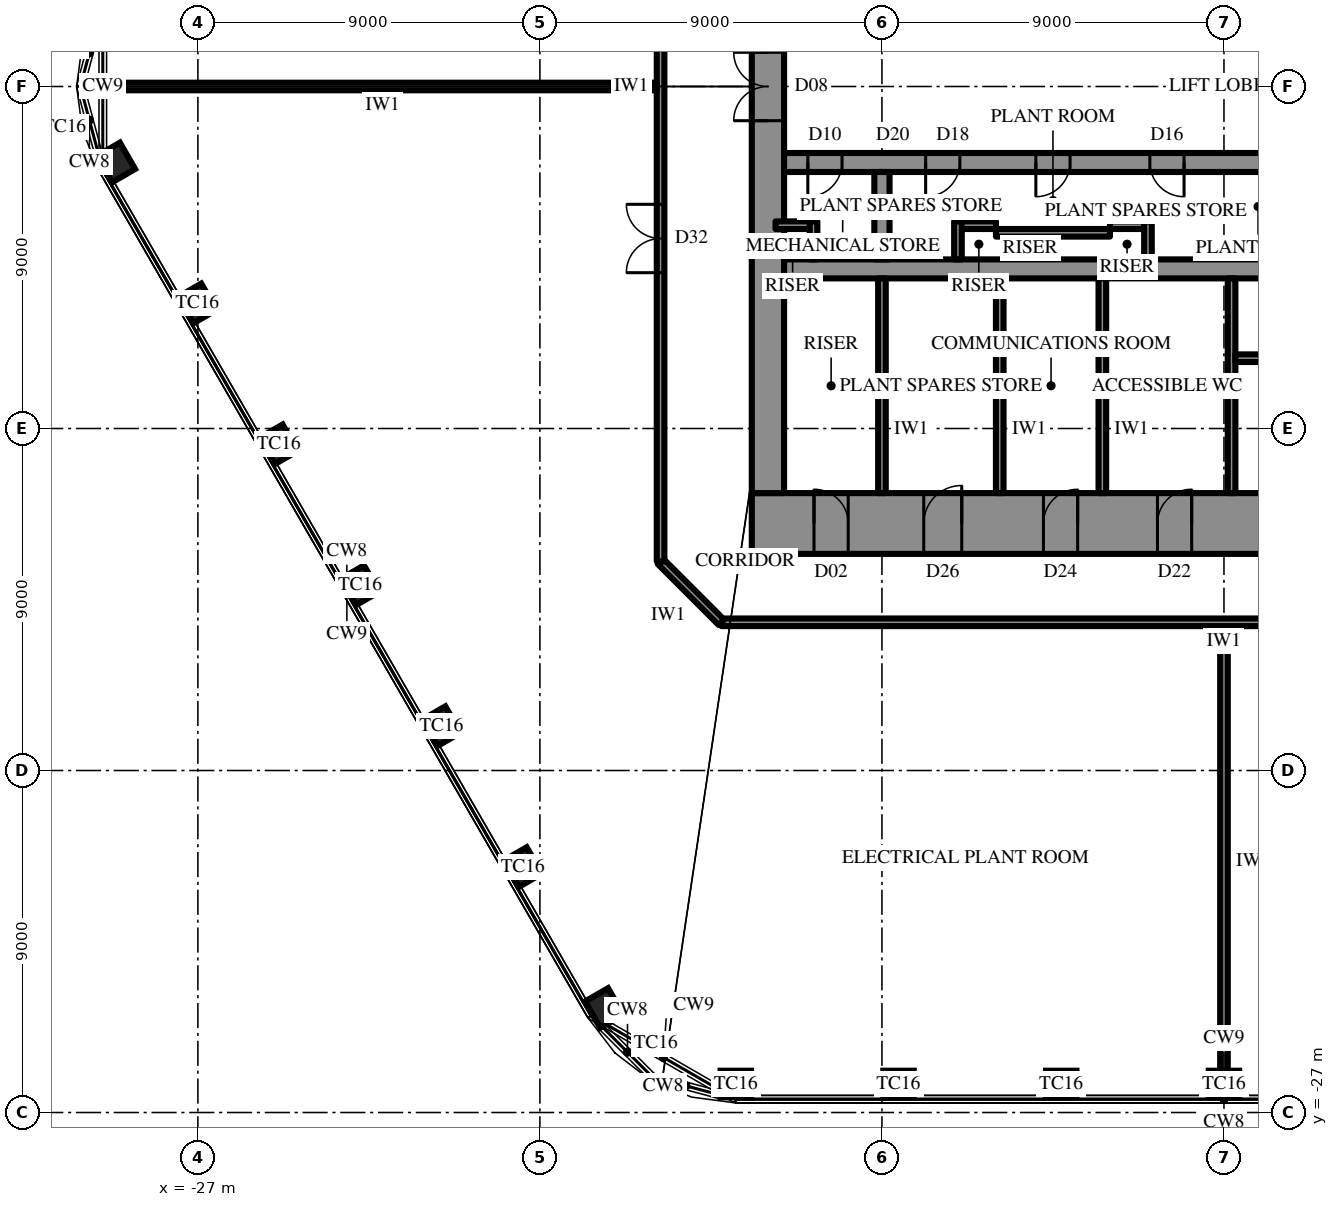
"""IFC4 building model, lengths in metres.
Left out: names, types, materials, properties, quantities, classifications, styles, units other than length and angle.
Written with IfcOpenShell. Run it as: python <this file> out.ifc"""

import sys

from ifc_helpers import new_model, si_unit, direction, frame, frame_2d, origin, origin_2d, place, context, subcontext, project, spatial, rectangle, extrude, element, fill, save


model = new_model("IFC4")
c1 = context("Model", 3, precision=1e-05, world=origin(), true_north=direction((0.0, 1.0)))
c2 = subcontext(c1, "Body", "Model", "MODEL_VIEW")
j1 = project(units=[si_unit("LENGTHUNIT", "METRE"), si_unit("PLANEANGLEUNIT", "RADIAN")], contexts=[c1])
p1 = place(None, origin())
s1 = spatial("IfcSite", under=j1, at=p1, CompositionType="ELEMENT")
p2 = place(p1, origin())
s2 = spatial("IfcBuilding", under=s1, at=p2, CompositionType="ELEMENT")
p3 = place(p2, frame((0.0, 0.0, 402.3)))
s3 = spatial("IfcBuildingStorey", under=s2, at=p3, CompositionType="ELEMENT", Elevation=402.3)
for number, where, z_axis, x_axis in (
    (1, (-29.156, -2.0, 0.0), (0.0, 0.0, 1.0), (0.5, -0.866, 0.0)),
    (2, (-27.015, -5.708, 0.0), (0.0, 0.0, 1.0), (0.5, -0.866, 0.0)),
    (3, (-24.874, -9.417, 0.0), (0.0, 0.0, 1.0), (0.5, -0.866, 0.0)),
    (4, (-22.733, -13.125, 0.0), (0.0, 0.0, 1.0), (0.5, -0.866, 0.0)),
    (5, (-20.592, -16.833, 0.0), (0.0, 0.0, 1.0), (0.5, -0.866, 0.0)),
    (6, (-18.451, -20.542, 0.0), (0.0, 0.0, 1.0), (0.5, -0.866, 0.0)),
    (7, (-16.31, -24.25, 0.0), (0.0, 0.0, 1.0), (0.5, -0.866, 0.0)),
    (8, (-12.846, -26.25, 0.0), (0.0, 0.0, 1.0), (1.0, 0.0, 0.0)),
    (9, (-8.564, -26.25, 0.0), (0.0, 0.0, 1.0), (1.0, 0.0, 0.0)),
    (10, (-4.282, -26.25, 0.0), (0.0, 0.0, 1.0), (1.0, 0.0, 0.0)),
    (11, (0.0, -26.25, 0.0), (0.0, 0.0, 1.0), (1.0, 0.0, 0.0)),
):
    element("IfcColumn", number, at=place(p3, frame(where, z_axis=z_axis, x_axis=x_axis)), inside=s3, PredefinedType="COLUMN", context=c2, shape_type="SweptSolid", body=[
        extrude(rectangle(XDim=0.8, YDim=0.7, at=origin_2d()), origin(), (0.0, 0.0, 1.0), 6.0),
    ])
p4 = place(p3, frame((12.425, -11.5, 0.0), z_axis=(0.0, 0.0, 1.0), x_axis=(-1.0, 0.0, 0.0)))
e12 = element("IfcWall", 12, at=p4, inside=s3, PredefinedType="SHEAR", context=c2, shape_type="SweptSolid", body=[
    extrude(rectangle(XDim=24.85, YDim=1.6, at=frame_2d((12.425, 0.0))), origin(), (0.0, 0.0, 1.0), 6.0),
])
p5 = place(p4, frame((13.275, 0.0, 0.0)))
e13 = element("IfcOpeningElement", 13, at=p5, cuts=e12, PredefinedType="OPENING", context=c2, shape_type="SweptSolid", body=[
    extrude(rectangle(XDim=0.9, YDim=2.2, at=frame_2d((0.45, 1.1))), frame((0.0, 0.81, 0.0), z_axis=(0.0, -1.0, 0.0), x_axis=(1.0, 0.0, 0.0)), (0.0, 0.0, 1.0), 1.62),
])
p6 = place(p4, frame((16.275, 0.0, 0.0)))
e14 = element("IfcOpeningElement", 14, at=p6, cuts=e12, PredefinedType="OPENING", context=c2, shape_type="SweptSolid", body=[
    extrude(rectangle(XDim=0.9, YDim=2.2, at=frame_2d((0.45, 1.1))), frame((0.0, 0.81, 0.0), z_axis=(0.0, -1.0, 0.0), x_axis=(1.0, 0.0, 0.0)), (0.0, 0.0, 1.0), 1.62),
])
p7 = place(p4, frame((19.325, 0.0, 0.0)))
e15 = element("IfcOpeningElement", 15, at=p7, cuts=e12, PredefinedType="OPENING", context=c2, shape_type="SweptSolid", body=[
    extrude(rectangle(XDim=1.0, YDim=2.2, at=frame_2d((0.5, 1.1))), frame((0.0, 0.81, 0.0), z_axis=(0.0, -1.0, 0.0), x_axis=(1.0, 0.0, 0.0)), (0.0, 0.0, 1.0), 1.62),
])
p8 = place(p4, frame((1.637, 0.0, 0.0)))
e16 = element("IfcOpeningElement", 16, at=p8, cuts=e12, PredefinedType="OPENING", context=c2, shape_type="SweptSolid", body=[
    extrude(rectangle(XDim=0.9, YDim=2.2, at=frame_2d((0.45, 1.1))), frame((0.0, 0.81, 0.0), z_axis=(0.0, -1.0, 0.0), x_axis=(1.0, 0.0, 0.0)), (0.0, 0.0, 1.0), 1.62),
])
p9 = place(p4, frame((22.312, 0.0, 0.0)))
e17 = element("IfcOpeningElement", 17, at=p9, cuts=e12, PredefinedType="OPENING", context=c2, shape_type="SweptSolid", body=[
    extrude(rectangle(XDim=0.9, YDim=2.2, at=frame_2d((0.45, 1.1))), frame((0.0, 0.81, 0.0), z_axis=(0.0, -1.0, 0.0), x_axis=(1.0, 0.0, 0.0)), (0.0, 0.0, 1.0), 1.62),
])
p10 = place(p3, frame((-12.0, 10.7, 0.0), z_axis=(0.0, 0.0, 1.0), x_axis=(0.0, -1.0, 0.0)))
e18 = element("IfcWall", 18, at=p10, inside=s3, PredefinedType="SHEAR", context=c2, shape_type="SweptSolid", body=[
    extrude(rectangle(XDim=21.4, YDim=0.85, at=frame_2d((10.7, 0.0))), origin(), (0.0, 0.0, 1.0), 6.0),
])
p11 = place(p10, frame((9.8, 0.0, 0.0)))
e19 = element("IfcOpeningElement", 19, at=p11, cuts=e18, PredefinedType="OPENING", context=c2, shape_type="SweptSolid", body=[
    extrude(rectangle(XDim=1.8, YDim=2.4, at=frame_2d((0.9, 1.2))), frame((0.0, 0.435, 0.0), z_axis=(0.0, -1.0, 0.0), x_axis=(1.0, 0.0, 0.0)), (0.0, 0.0, 1.0), 0.87),
])
p12 = place(p3, frame((3.2, -2.0, 0.0), z_axis=(0.0, 0.0, 1.0), x_axis=(-1.0, 0.0, 0.0)))
e20 = element("IfcWall", 20, at=p12, inside=s3, PredefinedType="SHEAR", context=c2, shape_type="SweptSolid", body=[
    extrude(rectangle(XDim=14.775, YDim=0.5, at=frame_2d((7.387, 0.0))), origin(), (0.0, 0.0, 1.0), 6.0),
])
p13 = place(p12, frame((1.35, 0.0, 0.0)))
e21 = element("IfcOpeningElement", 21, at=p13, cuts=e20, PredefinedType="OPENING", context=c2, shape_type="SweptSolid", body=[
    extrude(rectangle(XDim=0.9, YDim=2.2, at=frame_2d((0.45, 1.1))), frame((0.0, 0.26, 0.0), z_axis=(0.0, -1.0, 0.0), x_axis=(1.0, 0.0, 0.0)), (0.0, 0.0, 1.0), 0.52),
])
p14 = place(p12, frame((4.25, 0.0, 0.0)))
e22 = element("IfcOpeningElement", 22, at=p14, cuts=e20, PredefinedType="OPENING", context=c2, shape_type="SweptSolid", body=[
    extrude(rectangle(XDim=0.9, YDim=2.2, at=frame_2d((0.45, 1.1))), frame((0.0, 0.26, 0.0), z_axis=(0.0, -1.0, 0.0), x_axis=(1.0, 0.0, 0.0)), (0.0, 0.0, 1.0), 0.52),
])
p15 = place(p12, frame((7.25, 0.0, 0.0)))
e23 = element("IfcOpeningElement", 23, at=p15, cuts=e20, PredefinedType="OPENING", context=c2, shape_type="SweptSolid", body=[
    extrude(rectangle(XDim=0.9, YDim=2.2, at=frame_2d((0.45, 1.1))), frame((0.0, 0.26, 0.0), z_axis=(0.0, -1.0, 0.0), x_axis=(1.0, 0.0, 0.0)), (0.0, 0.0, 1.0), 0.52),
])
p16 = place(p12, frame((10.15, 0.0, 0.0)))
e24 = element("IfcOpeningElement", 24, at=p16, cuts=e20, PredefinedType="OPENING", context=c2, shape_type="SweptSolid", body=[
    extrude(rectangle(XDim=0.9, YDim=2.2, at=frame_2d((0.45, 1.1))), frame((0.0, 0.26, 0.0), z_axis=(0.0, -1.0, 0.0), x_axis=(1.0, 0.0, 0.0)), (0.0, 0.0, 1.0), 0.52),
])
p17 = place(p12, frame((13.25, 0.0, 0.0)))
e25 = element("IfcOpeningElement", 25, at=p17, cuts=e20, PredefinedType="OPENING", context=c2, shape_type="SweptSolid", body=[
    extrude(rectangle(XDim=0.9, YDim=2.2, at=frame_2d((0.45, 1.1))), frame((0.0, 0.26, 0.0), z_axis=(0.0, -1.0, 0.0), x_axis=(1.0, 0.0, 0.0)), (0.0, 0.0, 1.0), 0.52),
])
p18 = place(p3, frame((11.575, -4.8, 0.0), z_axis=(0.0, 0.0, 1.0), x_axis=(-1.0, 0.0, 0.0)))
e26 = element("IfcWall", 26, at=p18, inside=s3, PredefinedType="SHEAR", context=c2, shape_type="SweptSolid", body=[
    extrude(rectangle(XDim=23.15, YDim=0.5, at=frame_2d((11.575, 0.0))), origin(), (0.0, 0.0, 1.0), 6.0),
])
p19 = place(p18, frame((6.475, 0.0, 0.0)))
e27 = element("IfcOpeningElement", 27, at=p19, cuts=e26, PredefinedType="OPENING", context=c2, shape_type="SweptSolid", body=[
    extrude(rectangle(XDim=1.2, YDim=2.2, at=frame_2d((0.6, 1.1))), frame((0.0, 0.26, 0.0), z_axis=(0.0, -1.0, 0.0), x_axis=(1.0, 0.0, 0.0)), (0.0, 0.0, 1.0), 0.52),
])
p20 = place(p18, frame((3.475, 0.0, 0.0)))
e28 = element("IfcOpeningElement", 28, at=p20, cuts=e26, PredefinedType="OPENING", context=c2, shape_type="SweptSolid", body=[
    extrude(rectangle(XDim=1.2, YDim=2.2, at=frame_2d((0.6, 1.1))), frame((0.0, 0.26, 0.0), z_axis=(0.0, -1.0, 0.0), x_axis=(1.0, 0.0, 0.0)), (0.0, 0.0, 1.0), 0.52),
])
p21 = place(p3, frame((-9.0, -2.25, 0.0), z_axis=(0.0, 0.0, 1.0), x_axis=(0.0, -1.0, 0.0)))
e29 = element("IfcWall", 29, at=p21, inside=s3, PredefinedType="SHEAR", context=c2, shape_type="SweptSolid", body=[
    extrude(rectangle(XDim=2.3, YDim=0.4, at=frame_2d((1.15, 0.0))), origin(), (0.0, 0.0, 1.0), 6.0),
])
p22 = place(p3, frame((0.2, -5.05, 0.0), z_axis=(0.0, 0.0, 1.0), x_axis=(0.0, -1.0, 0.0)))
e30 = element("IfcWall", 30, at=p22, inside=s3, PredefinedType="SHEAR", context=c2, shape_type="SweptSolid", body=[
    extrude(rectangle(XDim=5.65, YDim=0.2, at=frame_2d((2.825, 0.0))), origin(), (0.0, 0.0, 1.0), 6.0),
])
p23 = place(p3, frame((8.9, -7.15, 0.0), z_axis=(0.0, 0.0, 1.0), x_axis=(-1.0, 0.0, 0.0)))
e31 = element("IfcWall", 31, at=p23, inside=s3, PredefinedType="SHEAR", context=c2, shape_type="SweptSolid", body=[
    extrude(rectangle(XDim=8.6, YDim=0.2, at=frame_2d((4.3, 0.0))), origin(), (0.0, 0.0, 1.0), 6.0),
])
p24 = place(p23, frame((0.3, 0.0, 0.0)))
e32 = element("IfcOpeningElement", 32, at=p24, cuts=e31, PredefinedType="OPENING", context=c2, shape_type="SweptSolid", body=[
    extrude(rectangle(XDim=1.0, YDim=2.2, at=frame_2d((0.5, 1.1))), frame((0.0, 0.11, 0.0), z_axis=(0.0, -1.0, 0.0), x_axis=(1.0, 0.0, 0.0)), (0.0, 0.0, 1.0), 0.22),
])
for number, where, z_axis, x_axis in (
    (33, (-9.0, -5.05, 0.0), (0.0, 0.0, 1.0), (0.0, -1.0, 0.0)),
    (34, (-3.2, -5.05, 0.0), (0.0, 0.0, 1.0), (0.0, -1.0, 0.0)),
    (35, (-5.9, -5.05, 0.0), (0.0, 0.0, 1.0), (0.0, -1.0, 0.0)),
):
    element("IfcWall", number, at=place(p3, frame(where, z_axis=z_axis, x_axis=x_axis)), inside=s3, PredefinedType="PARTITIONING", context=c2, shape_type="SweptSolid", body=[
        extrude(rectangle(XDim=5.65, YDim=0.2, at=frame_2d((2.825, 0.0))), origin(), (0.0, 0.0, 1.0), 5.7),
    ])
for number, where, z_axis, x_axis in (
    (36, (-2.0, -3.65, 0.0), (0.0, 0.0, 1.0), (-1.0, 0.0, 0.0)),
    (37, (-2.0, -3.55, 0.0), (0.0, 0.0, 1.0), (0.0, -1.0, 0.0)),
):
    element("IfcWall", number, at=place(p3, frame(where, z_axis=z_axis, x_axis=x_axis)), inside=s3, PredefinedType="PARTITIONING", context=c2, shape_type="SweptSolid", body=[
        extrude(rectangle(XDim=1.0, YDim=0.2, at=frame_2d((0.5, 0.0))), origin(), (0.0, 0.0, 1.0), 5.7),
    ])
p25 = place(p3, frame((-3.0, -3.85, 0.0), z_axis=(0.0, 0.0, 1.0), x_axis=(-1.0, 0.0, 0.0)))
e38 = element("IfcWall", 38, at=p25, inside=s3, PredefinedType="PARTITIONING", context=c2, shape_type="SweptSolid", body=[
    extrude(rectangle(XDim=3.0, YDim=0.2, at=frame_2d((1.5, 0.0))), origin(), (0.0, 0.0, 1.0), 5.7),
])
for number, where, z_axis, x_axis in (
    (39, (-6.0, -3.65, 0.0), (0.0, 0.0, 1.0), (-1.0, 0.0, 0.0)),
    (40, (-7.0, -3.55, 0.0), (0.0, 0.0, 1.0), (0.0, -1.0, 0.0)),
    (41, (-10.8, -3.65, 0.0), (0.0, 0.0, 1.0), (-1.0, 0.0, 0.0)),
    (42, (-10.8, -3.55, 0.0), (0.0, 0.0, 1.0), (0.0, -1.0, 0.0)),
):
    element("IfcWall", number, at=place(p3, frame(where, z_axis=z_axis, x_axis=x_axis)), inside=s3, PredefinedType="PARTITIONING", context=c2, shape_type="SweptSolid", body=[
        extrude(rectangle(XDim=1.0, YDim=0.2, at=frame_2d((0.5, 0.0))), origin(), (0.0, 0.0, 1.0), 5.7),
    ])
p26 = place(p3, frame((13.225, -14.1, 0.0), z_axis=(0.0, 0.0, 1.0), x_axis=(-1.0, 0.0, 0.0)))
e43 = element("IfcWall", 43, at=p26, inside=s3, PredefinedType="PARTITIONING", context=c2, shape_type="SweptSolid", body=[
    extrude(rectangle(XDim=26.45, YDim=0.2, at=frame_2d((13.225, 0.0))), origin(), (0.0, 0.0, 1.0), 5.7),
])
p27 = place(p26, frame((6.113, 0.0, 0.0)))
e44 = element("IfcOpeningElement", 44, at=p27, cuts=e43, PredefinedType="OPENING", context=c2, shape_type="SweptSolid", body=[
    extrude(rectangle(XDim=1.0, YDim=2.2, at=frame_2d((0.5, 1.1))), frame((0.0, 0.11, 0.0), z_axis=(0.0, -1.0, 0.0), x_axis=(1.0, 0.0, 0.0)), (0.0, 0.0, 1.0), 0.22),
])
p28 = place(p3, frame((-13.225, -14.1, 0.0), z_axis=(0.0, 0.0, 1.0), x_axis=(-0.707052830339, 0.707160727918, 0.0)))
e45 = element("IfcWall", 45, at=p28, inside=s3, PredefinedType="PARTITIONING", context=c2, shape_type="SweptSolid", body=[
    extrude(rectangle(XDim=2.263, YDim=0.2, at=frame_2d((1.131, 0.0))), origin(), (0.0, 0.0, 1.0), 5.7),
])
p29 = place(p3, frame((-14.825, -12.5, 0.0), z_axis=(0.0, 0.0, 1.0), x_axis=(0.0, 1.0, 0.0)))
e46 = element("IfcWall", 46, at=p29, inside=s3, PredefinedType="PARTITIONING", context=c2, shape_type="SweptSolid", body=[
    extrude(rectangle(XDim=25.0, YDim=0.2, at=frame_2d((12.5, 0.0))), origin(), (0.0, 0.0, 1.0), 5.7),
])
p30 = place(p29, frame((15.6, 0.0, 0.0)))
e47 = element("IfcOpeningElement", 47, at=p30, cuts=e46, PredefinedType="OPENING", context=c2, shape_type="SweptSolid", body=[
    extrude(rectangle(XDim=1.8, YDim=2.4, at=frame_2d((0.9, 1.2))), frame((0.0, 0.11, 0.0), z_axis=(0.0, -1.0, 0.0), x_axis=(1.0, 0.0, 0.0)), (0.0, 0.0, 1.0), 0.22),
])
p31 = place(p29, frame((7.6, 0.0, 0.0)))
e48 = element("IfcOpeningElement", 48, at=p31, cuts=e46, PredefinedType="OPENING", context=c2, shape_type="SweptSolid", body=[
    extrude(rectangle(XDim=1.8, YDim=2.4, at=frame_2d((0.9, 1.2))), frame((0.0, 0.11, 0.0), z_axis=(0.0, -1.0, 0.0), x_axis=(1.0, 0.0, 0.0)), (0.0, 0.0, 1.0), 0.22),
])
p32 = place(p3, frame((0.0, -14.2, 0.0), z_axis=(0.0, 0.0, 1.0), x_axis=(0.0, -1.0, 0.0)))
e49 = element("IfcWall", 49, at=p32, inside=s3, PredefinedType="PARTITIONING", context=c2, shape_type="SweptSolid", body=[
    extrude(rectangle(XDim=12.36, YDim=0.2, at=frame_2d((6.18, 0.0))), origin(), (0.0, 0.0, 1.0), 4.692),
])
p33 = place(p3, frame((-14.925, 0.0, 0.0), z_axis=(0.0, 0.0, 1.0), x_axis=(-1.0, 0.0, 0.0)))
e50 = element("IfcWall", 50, at=p33, inside=s3, PredefinedType="PARTITIONING", context=c2, shape_type="SweptSolid", body=[
    extrude(rectangle(XDim=14.422, YDim=0.2, at=frame_2d((7.211, 0.0))), origin(), (0.0, 0.0, 1.0), 4.664),
])
p34 = place(p3, frame((-29.347, 0.0, 0.0), z_axis=(0.0, 0.0, 1.0), x_axis=(-1.0, 0.0, 0.0)))
e51 = element("IfcWall", 51, at=p34, inside=s3, PredefinedType="PARTITIONING", context=c2, shape_type="SweptSolid", body=[
    extrude(rectangle(XDim=0.657, YDim=0.2, at=frame_2d((0.328, 0.0))), origin(), (0.0, 0.0, 1.0), 5.7),
])
p35 = place(p11, frame((1.8, 0.0, 0.0), z_axis=(0.0, 0.0, 1.0), x_axis=(-1.0, 0.0, 0.0)))
e52 = element("IfcDoor", 52, at=p35, inside=s3, OperationType="DOUBLE_DOOR_SINGLE_SWING", PredefinedType="DOOR", context=c2, shape_type="SweptSolid", body=[
    extrude(rectangle(XDim=1.8, YDim=2.4, at=frame_2d((0.9, 1.2))), frame((0.0, 0.025, 0.0), z_axis=(0.0, -1.0, 0.0), x_axis=(1.0, 0.0, 0.0)), (0.0, 0.0, 1.0), 0.05),
])
fill(e19, e52)
p36 = place(p5, frame((0.9, 0.0, 0.0), z_axis=(0.0, 0.0, 1.0), x_axis=(-1.0, 0.0, 0.0)))
e53 = element("IfcDoor", 53, at=p36, inside=s3, OperationType="SINGLE_SWING_LEFT", PredefinedType="DOOR", context=c2, shape_type="SweptSolid", body=[
    extrude(rectangle(XDim=0.9, YDim=2.2, at=frame_2d((0.45, 1.1))), frame((0.0, 0.025, 0.0), z_axis=(0.0, -1.0, 0.0), x_axis=(1.0, 0.0, 0.0)), (0.0, 0.0, 1.0), 0.05),
])
fill(e13, e53)
p37 = place(p6, frame((0.9, 0.0, 0.0), z_axis=(0.0, 0.0, 1.0), x_axis=(-1.0, 0.0, 0.0)))
e54 = element("IfcDoor", 54, at=p37, inside=s3, OperationType="SINGLE_SWING_LEFT", PredefinedType="DOOR", context=c2, shape_type="SweptSolid", body=[
    extrude(rectangle(XDim=0.9, YDim=2.2, at=frame_2d((0.45, 1.1))), frame((0.0, 0.025, 0.0), z_axis=(0.0, -1.0, 0.0), x_axis=(1.0, 0.0, 0.0)), (0.0, 0.0, 1.0), 0.05),
])
fill(e14, e54)
p38 = place(p7, frame((1.0, 0.0, 0.0), z_axis=(0.0, 0.0, 1.0), x_axis=(-1.0, 0.0, 0.0)))
e55 = element("IfcDoor", 55, at=p38, inside=s3, OperationType="SINGLE_SWING_LEFT", PredefinedType="DOOR", context=c2, shape_type="SweptSolid", body=[
    extrude(rectangle(XDim=1.0, YDim=2.2, at=frame_2d((0.5, 1.1))), frame((0.0, 0.025, 0.0), z_axis=(0.0, -1.0, 0.0), x_axis=(1.0, 0.0, 0.0)), (0.0, 0.0, 1.0), 0.05),
])
fill(e15, e55)
p39 = place(p9, frame((0.9, 0.0, 0.0), z_axis=(0.0, 0.0, 1.0), x_axis=(-1.0, 0.0, 0.0)))
e56 = element("IfcDoor", 56, at=p39, inside=s3, OperationType="SINGLE_SWING_RIGHT", PredefinedType="DOOR", context=c2, shape_type="SweptSolid", body=[
    extrude(rectangle(XDim=0.9, YDim=2.2, at=frame_2d((0.45, 1.1))), frame((0.0, 0.025, 0.0), z_axis=(0.0, -1.0, 0.0), x_axis=(1.0, 0.0, 0.0)), (0.0, 0.0, 1.0), 0.05),
])
fill(e17, e56)
p40 = place(p14, origin())
e57 = element("IfcDoor", 57, at=p40, inside=s3, OperationType="SINGLE_SWING_RIGHT", PredefinedType="DOOR", context=c2, shape_type="SweptSolid", body=[
    extrude(rectangle(XDim=0.9, YDim=2.2, at=frame_2d((0.45, 1.1))), frame((0.0, 0.025, 0.0), z_axis=(0.0, -1.0, 0.0), x_axis=(1.0, 0.0, 0.0)), (0.0, 0.0, 1.0), 0.05),
])
fill(e22, e57)
p41 = place(p15, origin())
e58 = element("IfcDoor", 58, at=p41, inside=s3, OperationType="SINGLE_SWING_LEFT", PredefinedType="DOOR", context=c2, shape_type="SweptSolid", body=[
    extrude(rectangle(XDim=0.9, YDim=2.2, at=frame_2d((0.45, 1.1))), frame((0.0, 0.025, 0.0), z_axis=(0.0, -1.0, 0.0), x_axis=(1.0, 0.0, 0.0)), (0.0, 0.0, 1.0), 0.05),
])
fill(e23, e58)
p42 = place(p16, origin())
e59 = element("IfcDoor", 59, at=p42, inside=s3, OperationType="SINGLE_SWING_LEFT", PredefinedType="DOOR", context=c2, shape_type="SweptSolid", body=[
    extrude(rectangle(XDim=0.9, YDim=2.2, at=frame_2d((0.45, 1.1))), frame((0.0, 0.025, 0.0), z_axis=(0.0, -1.0, 0.0), x_axis=(1.0, 0.0, 0.0)), (0.0, 0.0, 1.0), 0.05),
])
fill(e24, e59)
p43 = place(p17, origin())
e60 = element("IfcDoor", 60, at=p43, inside=s3, OperationType="SINGLE_SWING_LEFT", PredefinedType="DOOR", context=c2, shape_type="SweptSolid", body=[
    extrude(rectangle(XDim=0.9, YDim=2.2, at=frame_2d((0.45, 1.1))), frame((0.0, 0.025, 0.0), z_axis=(0.0, -1.0, 0.0), x_axis=(1.0, 0.0, 0.0)), (0.0, 0.0, 1.0), 0.05),
])
fill(e25, e60)
p44 = place(p31, origin())
e61 = element("IfcDoor", 61, at=p44, inside=s3, OperationType="DOUBLE_DOOR_SINGLE_SWING", PredefinedType="DOOR", context=c2, shape_type="SweptSolid", body=[
    extrude(rectangle(XDim=1.8, YDim=2.4, at=frame_2d((0.9, 1.2))), frame((0.0, 0.025, 0.0), z_axis=(0.0, -1.0, 0.0), x_axis=(1.0, 0.0, 0.0)), (0.0, 0.0, 1.0), 0.05),
])
fill(e48, e61)
save(model, sys.argv[1])
